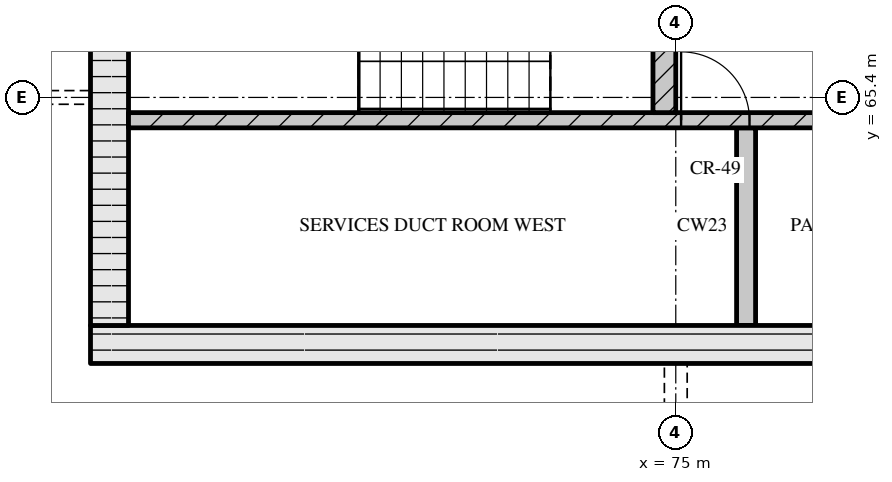
"""IFC4 building model, lengths in metres.
Left out: names, types, materials, properties, quantities, classifications, styles, units other than length and angle.
Written with IfcOpenShell. Run it as: python <this file> out.ifc"""

import sys

from ifc_helpers import new_model, si_unit, direction, frame, frame_2d, origin, place, context, subcontext, project, spatial, rectangle, extrude, element, fill, save


model = new_model("IFC4")
c1 = context("Model", 3, precision=1e-05, world=origin(), true_north=direction((0.0, 1.0)))
c2 = subcontext(c1, "Body", "Model", "MODEL_VIEW")
j1 = project(units=[si_unit("LENGTHUNIT", "METRE"), si_unit("PLANEANGLEUNIT", "RADIAN")], contexts=[c1])
p1 = place(None, origin())
s1 = spatial("IfcSite", under=j1, at=p1, CompositionType="ELEMENT")
p2 = place(p1, origin())
s2 = spatial("IfcBuilding", under=s1, at=p2, CompositionType="ELEMENT")
p3 = place(p2, frame((0.0, 0.0, 274.35)))
s3 = spatial("IfcBuildingStorey", under=s2, at=p3, CompositionType="ELEMENT", Elevation=274.35)
p4 = place(p3, frame((67.3, 62.15, 0.0), z_axis=(0.0, 0.0, 1.0), x_axis=(1.0, 0.0, 0.0)))
e1 = element("IfcWall", 1, at=p4, inside=s3, PredefinedType="SOLIDWALL", context=c2, shape_type="SweptSolid", body=[
    extrude(rectangle(XDim=40.6, YDim=0.5, at=frame_2d((20.3, 0.0))), origin(), (0.0, 0.0, 1.0), 3.32),
])
p5 = place(p4, frame((20.65, 0.0, 0.0)))
e2 = element("IfcOpeningElement", 2, at=p5, cuts=e1, PredefinedType="OPENING", context=c2, shape_type="SweptSolid", body=[
    extrude(rectangle(XDim=1.8, YDim=2.1, at=frame_2d((0.9, 1.05))), frame((0.0, 0.26, 0.0), z_axis=(0.0, -1.0, 0.0), x_axis=(1.0, 0.0, 0.0)), (0.0, 0.0, 1.0), 0.52),
])
p6 = place(p3, frame((67.55, 62.4, 0.0), z_axis=(0.0, 0.0, 1.0), x_axis=(0.0, 1.0, 0.0)))
e3 = element("IfcWall", 3, at=p6, inside=s3, PredefinedType="SOLIDWALL", context=c2, shape_type="SweptSolid", body=[
    extrude(rectangle(XDim=12.0, YDim=0.5, at=frame_2d((6.0, 0.0))), origin(), (0.0, 0.0, 1.0), 3.32),
])
p7 = place(p6, frame((6.45, 0.0, 0.0)))
e4 = element("IfcOpeningElement", 4, at=p7, cuts=e3, PredefinedType="OPENING", context=c2, shape_type="SweptSolid", body=[
    extrude(rectangle(XDim=1.2, YDim=2.1, at=frame_2d((0.6, 1.05))), frame((0.0, 0.26, 0.0), z_axis=(0.0, -1.0, 0.0), x_axis=(1.0, 0.0, 0.0)), (0.0, 0.0, 1.0), 0.52),
])
p8 = place(p3, frame((75.925, 62.4, 0.0), z_axis=(0.0, 0.0, 1.0), x_axis=(0.0, 1.0, 0.0)))
e5 = element("IfcWall", 5, at=p8, inside=s3, PredefinedType="SOLIDWALL", context=c2, shape_type="SweptSolid", body=[
    extrude(rectangle(XDim=2.6, YDim=0.25, at=frame_2d((1.3, 0.0))), origin(), (0.0, 0.0, 1.0), 3.32),
])
p9 = place(p3, frame((67.8, 65.1, 0.0), z_axis=(0.0, 0.0, 1.0), x_axis=(1.0, 0.0, 0.0)))
e6 = element("IfcWall", 6, at=p9, inside=s3, PredefinedType="SOLIDWALL", context=c2, shape_type="SweptSolid", body=[
    extrude(rectangle(XDim=18.5, YDim=0.2, at=frame_2d((9.25, 0.0))), origin(), (0.0, 0.0, 1.0), 3.32),
])
p10 = place(p9, frame((7.27, 0.0, 0.0)))
e7 = element("IfcOpeningElement", 7, at=p10, cuts=e6, PredefinedType="OPENING", context=c2, shape_type="SweptSolid", body=[
    extrude(rectangle(XDim=0.9, YDim=2.1, at=frame_2d((0.45, 1.05))), frame((0.0, 0.11, 0.0), z_axis=(0.0, -1.0, 0.0), x_axis=(1.0, 0.0, 0.0)), (0.0, 0.0, 1.0), 0.22),
])
p11 = place(p9, frame((9.05, 0.0, 0.0)))
e8 = element("IfcOpeningElement", 8, at=p11, cuts=e6, PredefinedType="OPENING", context=c2, shape_type="SweptSolid", body=[
    extrude(rectangle(XDim=0.9, YDim=2.1, at=frame_2d((0.45, 1.05))), frame((0.0, 0.11, 0.0), z_axis=(0.0, -1.0, 0.0), x_axis=(1.0, 0.0, 0.0)), (0.0, 0.0, 1.0), 0.22),
])
p12 = place(p9, frame((12.76, 0.0, 0.0)))
e9 = element("IfcOpeningElement", 9, at=p12, cuts=e6, PredefinedType="OPENING", context=c2, shape_type="SweptSolid", body=[
    extrude(rectangle(XDim=0.9, YDim=2.1, at=frame_2d((0.45, 1.05))), frame((0.0, 0.11, 0.0), z_axis=(0.0, -1.0, 0.0), x_axis=(1.0, 0.0, 0.0)), (0.0, 0.0, 1.0), 0.22),
])
p13 = place(p9, frame((16.7, 0.0, 0.0)))
e10 = element("IfcOpeningElement", 10, at=p13, cuts=e6, PredefinedType="OPENING", context=c2, shape_type="SweptSolid", body=[
    extrude(rectangle(XDim=0.9, YDim=2.1, at=frame_2d((0.45, 1.05))), frame((0.0, 0.11, 0.0), z_axis=(0.0, -1.0, 0.0), x_axis=(1.0, 0.0, 0.0)), (0.0, 0.0, 1.0), 0.22),
])
p14 = place(p3, frame((74.85, 65.2, 0.0), z_axis=(0.0, 0.0, 1.0), x_axis=(0.0, 1.0, 0.0)))
e11 = element("IfcWall", 11, at=p14, inside=s3, PredefinedType="SOLIDWALL", context=c2, shape_type="SweptSolid", body=[
    extrude(rectangle(XDim=2.85, YDim=0.3, at=frame_2d((1.425, 0.0))), origin(), (0.0, 0.0, 1.0), 3.32),
])
p15 = place(p10, origin())
e12 = element("IfcDoor", 12, at=p15, inside=s3, OperationType="SINGLE_SWING_LEFT", PredefinedType="DOOR", context=c2, shape_type="SweptSolid", body=[
    extrude(rectangle(XDim=0.9, YDim=2.1, at=frame_2d((0.45, 1.05))), frame((0.0, 0.025, 0.0), z_axis=(0.0, -1.0, 0.0), x_axis=(1.0, 0.0, 0.0)), (0.0, 0.0, 1.0), 0.05),
])
fill(e7, e12)
save(model, sys.argv[1])
